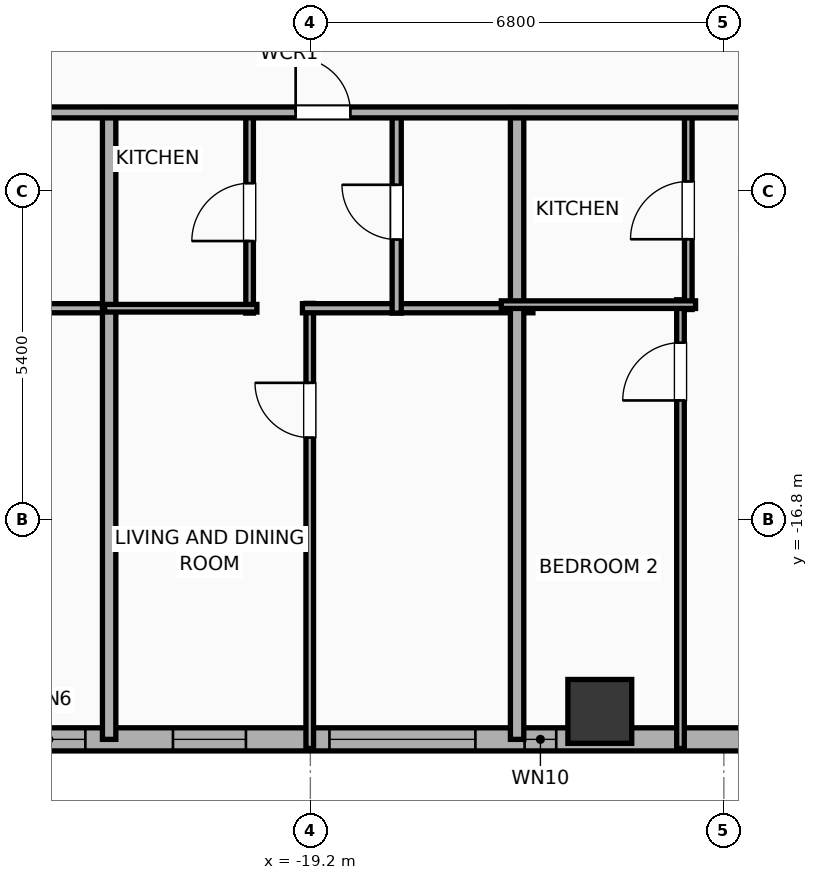
"""IFC4 building model, lengths in metres.
Left out: names, types, materials, properties, quantities, classifications, styles, units other than length and angle.
Written with IfcOpenShell. Run it as: python <this file> out.ifc"""

import sys

from ifc_helpers import new_model, si_unit, direction, frame, frame_2d, origin, origin_2d, place, context, subcontext, project, spatial, rectangle, hollow_rectangle, extrude, element, fill, save


model = new_model("IFC4")
c1 = context("Model", 3, precision=1e-05, world=origin(), true_north=direction((0.0, 1.0)))
c2 = subcontext(c1, "Body", "Model", "MODEL_VIEW")
j1 = project(units=[si_unit("LENGTHUNIT", "METRE"), si_unit("PLANEANGLEUNIT", "RADIAN")], contexts=[c1])
p1 = place(None, origin())
s1 = spatial("IfcSite", under=j1, at=p1, CompositionType="ELEMENT")
p2 = place(p1, origin())
s2 = spatial("IfcBuilding", under=s1, at=p2, CompositionType="ELEMENT")
p3 = place(p2, frame((0.0, 0.0, 105.3)))
s3 = spatial("IfcBuildingStorey", under=s2, at=p3, CompositionType="ELEMENT", Elevation=105.3)
p4 = place(p3, frame((-14.44, -19.95, 0.0), z_axis=(0.0, 0.0, 1.0), x_axis=(1.0, 0.0, 0.0)))
e1 = element("IfcColumn", 1, at=p4, inside=s3, PredefinedType="COLUMN", context=c2, shape_type="SweptSolid", body=[
    extrude(hollow_rectangle(XDim=1.05, YDim=1.05, WallThickness=0.036, at=origin_2d()), origin(), (0.0, 0.0, 1.0), 3.9),
])
p5 = place(p3, frame((29.381, -20.41, 0.0), z_axis=(0.0, 0.0, 1.0), x_axis=(-1.0, 0.0, 0.0)))
e2 = element("IfcWall", 2, at=p5, inside=s3, PredefinedType="ELEMENTEDWALL", context=c2, shape_type="SweptSolid", body=[
    extrude(rectangle(XDim=54.763, YDim=0.38, at=frame_2d((27.381, 0.0))), origin(), (0.0, 0.0, 1.0), 3.65),
])
p6 = place(p5, frame((6.495, 0.0, 0.75)))
e3 = element("IfcOpeningElement", 3, at=p6, cuts=e2, PredefinedType="OPENING", context=c2, shape_type="SweptSolid", body=[
    extrude(rectangle(XDim=2.4, YDim=2.1, at=frame_2d((1.2, 1.05))), frame((0.0, 0.2, 0.0), z_axis=(0.0, -1.0, 0.0), x_axis=(1.0, 0.0, 0.0)), (0.0, 0.0, 1.0), 0.4),
])
p7 = place(p5, frame((17.686, 0.0, 0.75)))
e4 = element("IfcOpeningElement", 4, at=p7, cuts=e2, PredefinedType="OPENING", context=c2, shape_type="SweptSolid", body=[
    extrude(rectangle(XDim=2.4, YDim=2.1, at=frame_2d((1.2, 1.05))), frame((0.0, 0.2, 0.0), z_axis=(0.0, -1.0, 0.0), x_axis=(1.0, 0.0, 0.0)), (0.0, 0.0, 1.0), 0.4),
])
p8 = place(p5, frame((34.677, 0.0, 0.75)))
e5 = element("IfcOpeningElement", 5, at=p8, cuts=e2, PredefinedType="OPENING", context=c2, shape_type="SweptSolid", body=[
    extrude(rectangle(XDim=2.4, YDim=2.1, at=frame_2d((1.2, 1.05))), frame((0.0, 0.2, 0.0), z_axis=(0.0, -1.0, 0.0), x_axis=(1.0, 0.0, 0.0)), (0.0, 0.0, 1.0), 0.4),
])
p9 = place(p5, frame((45.867, 0.0, 0.75)))
e6 = element("IfcOpeningElement", 6, at=p9, cuts=e2, PredefinedType="OPENING", context=c2, shape_type="SweptSolid", body=[
    extrude(rectangle(XDim=2.4, YDim=2.1, at=frame_2d((1.2, 1.05))), frame((0.0, 0.2, 0.0), z_axis=(0.0, -1.0, 0.0), x_axis=(1.0, 0.0, 0.0)), (0.0, 0.0, 1.0), 0.4),
])
p10 = place(p5, frame((52.281, 0.0, 0.75)))
e7 = element("IfcOpeningElement", 7, at=p10, cuts=e2, PredefinedType="OPENING", context=c2, shape_type="SweptSolid", body=[
    extrude(rectangle(XDim=1.2, YDim=2.05, at=frame_2d((0.6, 1.025))), frame((0.0, 0.2, 0.0), z_axis=(0.0, -1.0, 0.0), x_axis=(1.0, 0.0, 0.0)), (0.0, 0.0, 1.0), 0.4),
])
p11 = place(p5, frame((49.641, 0.0, 0.75)))
e8 = element("IfcOpeningElement", 8, at=p11, cuts=e2, PredefinedType="OPENING", context=c2, shape_type="SweptSolid", body=[
    extrude(rectangle(XDim=1.2, YDim=2.05, at=frame_2d((0.6, 1.025))), frame((0.0, 0.2, 0.0), z_axis=(0.0, -1.0, 0.0), x_axis=(1.0, 0.0, 0.0)), (0.0, 0.0, 1.0), 0.4),
])
p12 = place(p5, frame((39.543, 0.0, 0.75)))
e9 = element("IfcOpeningElement", 9, at=p12, cuts=e2, PredefinedType="OPENING", context=c2, shape_type="SweptSolid", body=[
    extrude(rectangle(XDim=1.2, YDim=2.05, at=frame_2d((0.6, 1.025))), frame((0.0, 0.2, 0.0), z_axis=(0.0, -1.0, 0.0), x_axis=(1.0, 0.0, 0.0)), (0.0, 0.0, 1.0), 0.4),
])
p13 = place(p5, frame((44.538, 0.0, 0.75)))
e10 = element("IfcOpeningElement", 10, at=p13, cuts=e2, PredefinedType="OPENING", context=c2, shape_type="SweptSolid", body=[
    extrude(rectangle(XDim=0.52, YDim=2.05, at=frame_2d((0.26, 1.025))), frame((0.0, 0.2, 0.0), z_axis=(0.0, -1.0, 0.0), x_axis=(1.0, 0.0, 0.0)), (0.0, 0.0, 1.0), 0.4),
])
p14 = place(p5, frame((28.206, 0.0, 0.75)))
e11 = element("IfcOpeningElement", 11, at=p14, cuts=e2, PredefinedType="OPENING", context=c2, shape_type="SweptSolid", body=[
    extrude(rectangle(XDim=1.2, YDim=2.05, at=frame_2d((0.6, 1.025))), frame((0.0, 0.2, 0.0), z_axis=(0.0, -1.0, 0.0), x_axis=(1.0, 0.0, 0.0)), (0.0, 0.0, 1.0), 0.4),
])
p15 = place(p5, frame((31.241, 0.0, 0.75)))
e12 = element("IfcOpeningElement", 12, at=p15, cuts=e2, PredefinedType="OPENING", context=c2, shape_type="SweptSolid", body=[
    extrude(rectangle(XDim=0.85, YDim=2.05, at=frame_2d((0.425, 1.025))), frame((0.0, 0.2, 0.0), z_axis=(0.0, -1.0, 0.0), x_axis=(1.0, 0.0, 0.0)), (0.0, 0.0, 1.0), 0.4),
])
p16 = place(p5, frame((24.561, 0.0, 0.75)))
e13 = element("IfcOpeningElement", 13, at=p16, cuts=e2, PredefinedType="OPENING", context=c2, shape_type="SweptSolid", body=[
    extrude(rectangle(XDim=1.2, YDim=2.05, at=frame_2d((0.6, 1.025))), frame((0.0, 0.2, 0.0), z_axis=(0.0, -1.0, 0.0), x_axis=(1.0, 0.0, 0.0)), (0.0, 0.0, 1.0), 0.4),
])
p17 = place(p5, frame((22.561, 0.0, 0.75)))
e14 = element("IfcOpeningElement", 14, at=p17, cuts=e2, PredefinedType="OPENING", context=c2, shape_type="SweptSolid", body=[
    extrude(rectangle(XDim=0.52, YDim=2.05, at=frame_2d((0.26, 1.025))), frame((0.0, 0.2, 0.0), z_axis=(0.0, -1.0, 0.0), x_axis=(1.0, 0.0, 0.0)), (0.0, 0.0, 1.0), 0.4),
])
p18 = place(p5, frame((13.886, 0.0, 0.75)))
e15 = element("IfcOpeningElement", 15, at=p18, cuts=e2, PredefinedType="OPENING", context=c2, shape_type="SweptSolid", body=[
    extrude(rectangle(XDim=1.2, YDim=2.05, at=frame_2d((0.6, 1.025))), frame((0.0, 0.2, 0.0), z_axis=(0.0, -1.0, 0.0), x_axis=(1.0, 0.0, 0.0)), (0.0, 0.0, 1.0), 0.4),
])
p19 = place(p5, frame((11.694, 0.0, 0.75)))
e16 = element("IfcOpeningElement", 16, at=p19, cuts=e2, PredefinedType="OPENING", context=c2, shape_type="SweptSolid", body=[
    extrude(rectangle(XDim=0.85, YDim=2.05, at=frame_2d((0.425, 1.025))), frame((0.0, 0.2, 0.0), z_axis=(0.0, -1.0, 0.0), x_axis=(1.0, 0.0, 0.0)), (0.0, 0.0, 1.0), 0.4),
])
p20 = place(p5, frame((3.286, 0.0, 0.75)))
e17 = element("IfcOpeningElement", 17, at=p20, cuts=e2, PredefinedType="OPENING", context=c2, shape_type="SweptSolid", body=[
    extrude(rectangle(XDim=1.2, YDim=2.05, at=frame_2d((0.6, 1.025))), frame((0.0, 0.2, 0.0), z_axis=(0.0, -1.0, 0.0), x_axis=(1.0, 0.0, 0.0)), (0.0, 0.0, 1.0), 0.4),
])
p21 = place(p5, frame((0.816, 0.0, 0.75)))
e18 = element("IfcOpeningElement", 18, at=p21, cuts=e2, PredefinedType="OPENING", context=c2, shape_type="SweptSolid", body=[
    extrude(rectangle(XDim=1.2, YDim=2.05, at=frame_2d((0.6, 1.025))), frame((0.0, 0.2, 0.0), z_axis=(0.0, -1.0, 0.0), x_axis=(1.0, 0.0, 0.0)), (0.0, 0.0, 1.0), 0.4),
])
p22 = place(p3, frame((-26.039, -13.32, 0.0), z_axis=(0.0, 0.0, 1.0), x_axis=(1.0, 0.0, 0.0)))
e19 = element("IfcWall", 19, at=p22, inside=s3, PredefinedType="PLUMBINGWALL", context=c2, shape_type="SweptSolid", body=[
    extrude(rectangle(XDim=3.605, YDim=0.15, at=frame_2d((1.802, 0.0))), origin(), (0.0, 0.0, 1.0), 3.65),
])
p23 = place(p3, frame((-22.509, -20.41, 0.0), z_axis=(0.0, 0.0, 1.0), x_axis=(0.0, 1.0, 0.0)))
e20 = element("IfcWall", 20, at=p23, inside=s3, PredefinedType="PARTITIONING", context=c2, shape_type="SweptSolid", body=[
    extrude(rectangle(XDim=10.39, YDim=0.22, at=frame_2d((5.195, 0.0))), origin(), (0.0, 0.0, 1.0), 3.65),
])
p24 = place(p3, frame((-19.21, -20.56, 0.0), z_axis=(0.0, 0.0, 1.0), x_axis=(0.0, 1.0, 0.0)))
e21 = element("IfcWall", 21, at=p24, inside=s3, PredefinedType="PARTITIONING", context=c2, shape_type="SweptSolid", body=[
    extrude(rectangle(XDim=7.32, YDim=0.125, at=frame_2d((3.66, 0.0))), origin(), (0.0, 0.0, 1.0), 3.65),
])
p25 = place(p24, frame((5.113, 0.0, 0.0)))
e22 = element("IfcOpeningElement", 22, at=p25, cuts=e21, PredefinedType="OPENING", context=c2, shape_type="SweptSolid", body=[
    extrude(rectangle(XDim=0.9, YDim=2.05, at=frame_2d((0.45, 1.025))), frame((0.0, 0.073, 0.0), z_axis=(0.0, -1.0, 0.0), x_axis=(1.0, 0.0, 0.0)), (0.0, 0.0, 1.0), 0.145),
])
p26 = place(p3, frame((-19.33, -13.32, 0.0), z_axis=(0.0, 0.0, 1.0), x_axis=(1.0, 0.0, 0.0)))
e23 = element("IfcWall", 23, at=p26, inside=s3, PredefinedType="PLUMBINGWALL", context=c2, shape_type="SweptSolid", body=[
    extrude(rectangle(XDim=3.79, YDim=0.15, at=frame_2d((1.895, 0.0))), origin(), (0.0, 0.0, 1.0), 3.65),
])
p27 = place(p3, frame((-20.199, -13.4, 0.0), z_axis=(0.0, 0.0, 1.0), x_axis=(0.0, 1.0, 0.0)))
e24 = element("IfcWall", 24, at=p27, inside=s3, PredefinedType="PARTITIONING", context=c2, shape_type="SweptSolid", body=[
    extrude(rectangle(XDim=3.32, YDim=0.125, at=frame_2d((1.66, 0.0))), origin(), (0.0, 0.0, 1.0), 3.65),
])
p28 = place(p27, frame((1.185, 0.0, 0.0)))
e25 = element("IfcOpeningElement", 25, at=p28, cuts=e24, PredefinedType="OPENING", context=c2, shape_type="SweptSolid", body=[
    extrude(rectangle(XDim=0.95, YDim=2.05, at=frame_2d((0.475, 1.025))), frame((0.0, 0.073, 0.0), z_axis=(0.0, -1.0, 0.0), x_axis=(1.0, 0.0, 0.0)), (0.0, 0.0, 1.0), 0.145),
])
p29 = place(p3, frame((-22.584, -13.32, 0.0), z_axis=(0.0, 0.0, 1.0), x_axis=(1.0, 0.0, 0.0)))
e26 = element("IfcWall", 26, at=p29, inside=s3, PredefinedType="PARTITIONING", context=c2, shape_type="SweptSolid", body=[
    extrude(rectangle(XDim=2.505, YDim=0.125, at=frame_2d((1.252, 0.0))), origin(), (0.0, 0.0, 1.0), 3.65),
])
p30 = place(p3, frame((-17.78, -13.4, 0.0), z_axis=(0.0, 0.0, 1.0), x_axis=(0.0, 1.0, 0.0)))
e27 = element("IfcWall", 27, at=p30, inside=s3, PredefinedType="PLUMBINGWALL", context=c2, shape_type="SweptSolid", body=[
    extrude(rectangle(XDim=3.32, YDim=0.15, at=frame_2d((1.66, 0.0))), origin(), (0.0, 0.0, 1.0), 3.65),
])
p31 = place(p30, frame((1.21, 0.0, 0.0)))
e28 = element("IfcOpeningElement", 28, at=p31, cuts=e27, PredefinedType="OPENING", context=c2, shape_type="SweptSolid", body=[
    extrude(rectangle(XDim=0.9, YDim=2.05, at=frame_2d((0.45, 1.025))), frame((0.0, 0.085, 0.0), z_axis=(0.0, -1.0, 0.0), x_axis=(1.0, 0.0, 0.0)), (0.0, 0.0, 1.0), 0.17),
])
p32 = place(p3, frame((-15.8, -20.41, 0.0), z_axis=(0.0, 0.0, 1.0), x_axis=(0.0, 1.0, 0.0)))
e29 = element("IfcWall", 29, at=p32, inside=s3, PredefinedType="PARTITIONING", context=c2, shape_type="SweptSolid", body=[
    extrude(rectangle(XDim=10.39, YDim=0.22, at=frame_2d((5.195, 0.0))), origin(), (0.0, 0.0, 1.0), 3.65),
])
p33 = place(p3, frame((-13.113, -20.56, 0.0), z_axis=(0.0, 0.0, 1.0), x_axis=(0.0, 1.0, 0.0)))
e30 = element("IfcWall", 30, at=p33, inside=s3, PredefinedType="PARTITIONING", context=c2, shape_type="SweptSolid", body=[
    extrude(rectangle(XDim=7.379, YDim=0.125, at=frame_2d((3.689, 0.0))), origin(), (0.0, 0.0, 1.0), 3.65),
])
p34 = place(p33, frame((5.723, 0.0, 0.0)))
e31 = element("IfcOpeningElement", 31, at=p34, cuts=e30, PredefinedType="OPENING", context=c2, shape_type="SweptSolid", body=[
    extrude(rectangle(XDim=0.95, YDim=2.05, at=frame_2d((0.475, 1.025))), frame((0.0, 0.073, 0.0), z_axis=(0.0, -1.0, 0.0), x_axis=(1.0, 0.0, 0.0)), (0.0, 0.0, 1.0), 0.145),
])
p35 = place(p3, frame((-12.985, -13.341, 0.0), z_axis=(0.0, 0.0, 1.0), x_axis=(0.0, 1.0, 0.0)))
e32 = element("IfcWall", 32, at=p35, inside=s3, PredefinedType="PARTITIONING", context=c2, shape_type="SweptSolid", body=[
    extrude(rectangle(XDim=3.261, YDim=0.125, at=frame_2d((1.63, 0.0))), origin(), (0.0, 0.0, 1.0), 3.65),
])
p36 = place(p35, frame((1.156, 0.0, 0.0)))
e33 = element("IfcOpeningElement", 33, at=p36, cuts=e32, PredefinedType="OPENING", context=c2, shape_type="SweptSolid", body=[
    extrude(rectangle(XDim=0.95, YDim=2.05, at=frame_2d((0.475, 1.025))), frame((0.0, 0.073, 0.0), z_axis=(0.0, -1.0, 0.0), x_axis=(1.0, 0.0, 0.0)), (0.0, 0.0, 1.0), 0.145),
])
p37 = place(p3, frame((-16.06, -13.261, 0.0), z_axis=(0.0, 0.0, 1.0), x_axis=(1.0, 0.0, 0.0)))
e34 = element("IfcWall", 34, at=p37, inside=s3, PredefinedType="PARTITIONING", context=c2, shape_type="SweptSolid", body=[
    extrude(rectangle(XDim=3.195, YDim=0.125, at=frame_2d((1.598, 0.0))), origin(), (0.0, 0.0, 1.0), 3.65),
])
p38 = place(p3, frame((-29.21, -10.1, 0.0), z_axis=(0.0, 0.0, 1.0), x_axis=(1.0, 0.0, 0.0)))
e35 = element("IfcWall", 35, at=p38, inside=s3, PredefinedType="PARTITIONING", context=c2, shape_type="SweptSolid", body=[
    extrude(rectangle(XDim=62.42, YDim=0.18, at=frame_2d((31.21, 0.0))), origin(), (0.0, 0.0, 1.0), 3.65),
])
p39 = place(p38, frame((3.033, 0.0, 0.0)))
e36 = element("IfcOpeningElement", 36, at=p39, cuts=e35, PredefinedType="OPENING", context=c2, shape_type="SweptSolid", body=[
    extrude(rectangle(XDim=0.9, YDim=2.05, at=frame_2d((0.45, 1.025))), frame((0.0, 0.1, 0.0), z_axis=(0.0, -1.0, 0.0), x_axis=(1.0, 0.0, 0.0)), (0.0, 0.0, 1.0), 0.2),
])
p40 = place(p38, frame((9.768, 0.0, 0.0)))
e37 = element("IfcOpeningElement", 37, at=p40, cuts=e35, PredefinedType="OPENING", context=c2, shape_type="SweptSolid", body=[
    extrude(rectangle(XDim=0.9, YDim=2.05, at=frame_2d((0.45, 1.025))), frame((0.0, 0.1, 0.0), z_axis=(0.0, -1.0, 0.0), x_axis=(1.0, 0.0, 0.0)), (0.0, 0.0, 1.0), 0.2),
])
p41 = place(p38, frame((18.65, 0.0, 0.0)))
e38 = element("IfcOpeningElement", 38, at=p41, cuts=e35, PredefinedType="OPENING", context=c2, shape_type="SweptSolid", body=[
    extrude(rectangle(XDim=1.15, YDim=2.05, at=frame_2d((0.575, 1.025))), frame((0.0, 0.1, 0.0), z_axis=(0.0, -1.0, 0.0), x_axis=(1.0, 0.0, 0.0)), (0.0, 0.0, 1.0), 0.2),
])
p42 = place(p38, frame((29.212, 0.0, 0.0)))
e39 = element("IfcOpeningElement", 39, at=p42, cuts=e35, PredefinedType="OPENING", context=c2, shape_type="SweptSolid", body=[
    extrude(rectangle(XDim=1.15, YDim=2.05, at=frame_2d((0.575, 1.025))), frame((0.0, 0.1, 0.0), z_axis=(0.0, -1.0, 0.0), x_axis=(1.0, 0.0, 0.0)), (0.0, 0.0, 1.0), 0.2),
])
p43 = place(p38, frame((40.379, 0.0, 0.0)))
e40 = element("IfcOpeningElement", 40, at=p43, cuts=e35, PredefinedType="OPENING", context=c2, shape_type="SweptSolid", body=[
    extrude(rectangle(XDim=1.15, YDim=2.05, at=frame_2d((0.575, 1.025))), frame((0.0, 0.1, 0.0), z_axis=(0.0, -1.0, 0.0), x_axis=(1.0, 0.0, 0.0)), (0.0, 0.0, 1.0), 0.2),
])
p44 = place(p38, frame((50.959, 0.0, 0.0)))
e41 = element("IfcOpeningElement", 41, at=p44, cuts=e35, PredefinedType="OPENING", context=c2, shape_type="SweptSolid", body=[
    extrude(rectangle(XDim=1.15, YDim=2.05, at=frame_2d((0.575, 1.025))), frame((0.0, 0.1, 0.0), z_axis=(0.0, -1.0, 0.0), x_axis=(1.0, 0.0, 0.0)), (0.0, 0.0, 1.0), 0.2),
])
p45 = place(p38, frame((59.117, 0.0, 0.0)))
e42 = element("IfcOpeningElement", 42, at=p45, cuts=e35, PredefinedType="OPENING", context=c2, shape_type="SweptSolid", body=[
    extrude(rectangle(XDim=0.9, YDim=2.05, at=frame_2d((0.45, 1.025))), frame((0.0, 0.1, 0.0), z_axis=(0.0, -1.0, 0.0), x_axis=(1.0, 0.0, 0.0)), (0.0, 0.0, 1.0), 0.2),
])
p46 = place(p9, origin())
e43 = element("IfcWindow", 43, at=p46, inside=s3, PartitioningType="SINGLE_PANEL", PredefinedType="WINDOW", context=c2, shape_type="SweptSolid", body=[
    extrude(rectangle(XDim=2.4, YDim=2.1, at=frame_2d((1.2, 1.05))), frame((0.0, 0.03, 0.0), z_axis=(0.0, -1.0, 0.0), x_axis=(1.0, 0.0, 0.0)), (0.0, 0.0, 1.0), 0.06),
])
fill(e6, e43)
p47 = place(p10, origin())
e44 = element("IfcWindow", 44, at=p47, inside=s3, PartitioningType="SINGLE_PANEL", PredefinedType="WINDOW", context=c2, shape_type="SweptSolid", body=[
    extrude(rectangle(XDim=1.2, YDim=2.05, at=frame_2d((0.6, 1.025))), frame((0.0, 0.03, 0.0), z_axis=(0.0, -1.0, 0.0), x_axis=(1.0, 0.0, 0.0)), (0.0, 0.0, 1.0), 0.06),
])
fill(e7, e44)
p48 = place(p11, origin())
e45 = element("IfcWindow", 45, at=p48, inside=s3, PartitioningType="SINGLE_PANEL", PredefinedType="WINDOW", context=c2, shape_type="SweptSolid", body=[
    extrude(rectangle(XDim=1.2, YDim=2.05, at=frame_2d((0.6, 1.025))), frame((0.0, 0.03, 0.0), z_axis=(0.0, -1.0, 0.0), x_axis=(1.0, 0.0, 0.0)), (0.0, 0.0, 1.0), 0.06),
])
fill(e8, e45)
p49 = place(p13, origin())
e46 = element("IfcWindow", 46, at=p49, inside=s3, PartitioningType="SINGLE_PANEL", PredefinedType="WINDOW", context=c2, shape_type="SweptSolid", body=[
    extrude(rectangle(XDim=0.52, YDim=2.05, at=frame_2d((0.26, 1.025))), frame((0.0, 0.03, 0.0), z_axis=(0.0, -1.0, 0.0), x_axis=(1.0, 0.0, 0.0)), (0.0, 0.0, 1.0), 0.06),
])
fill(e10, e46)
p50 = place(p25, origin())
e47 = element("IfcDoor", 47, at=p50, inside=s3, OperationType="SINGLE_SWING_RIGHT", PredefinedType="DOOR", context=c2, shape_type="SweptSolid", body=[
    extrude(rectangle(XDim=0.9, YDim=2.05, at=frame_2d((0.45, 1.025))), frame((0.0, 0.025, 0.0), z_axis=(0.0, -1.0, 0.0), x_axis=(1.0, 0.0, 0.0)), (0.0, 0.0, 1.0), 0.05),
])
fill(e22, e47)
p51 = place(p28, origin())
e48 = element("IfcDoor", 48, at=p51, inside=s3, OperationType="SINGLE_SWING_LEFT", PredefinedType="DOOR", context=c2, shape_type="SweptSolid", body=[
    extrude(rectangle(XDim=0.95, YDim=2.05, at=frame_2d((0.475, 1.025))), frame((0.0, 0.025, 0.0), z_axis=(0.0, -1.0, 0.0), x_axis=(1.0, 0.0, 0.0)), (0.0, 0.0, 1.0), 0.05),
])
fill(e25, e48)
p52 = place(p31, origin())
e49 = element("IfcDoor", 49, at=p52, inside=s3, OperationType="SINGLE_SWING_RIGHT", PredefinedType="DOOR", context=c2, shape_type="SweptSolid", body=[
    extrude(rectangle(XDim=0.9, YDim=2.05, at=frame_2d((0.45, 1.025))), frame((0.0, 0.025, 0.0), z_axis=(0.0, -1.0, 0.0), x_axis=(1.0, 0.0, 0.0)), (0.0, 0.0, 1.0), 0.05),
])
fill(e28, e49)
p53 = place(p34, origin())
e50 = element("IfcDoor", 50, at=p53, inside=s3, OperationType="SINGLE_SWING_LEFT", PredefinedType="DOOR", context=c2, shape_type="SweptSolid", body=[
    extrude(rectangle(XDim=0.95, YDim=2.05, at=frame_2d((0.475, 1.025))), frame((0.0, 0.025, 0.0), z_axis=(0.0, -1.0, 0.0), x_axis=(1.0, 0.0, 0.0)), (0.0, 0.0, 1.0), 0.05),
])
fill(e31, e50)
p54 = place(p36, origin())
e51 = element("IfcDoor", 51, at=p54, inside=s3, OperationType="SINGLE_SWING_LEFT", PredefinedType="DOOR", context=c2, shape_type="SweptSolid", body=[
    extrude(rectangle(XDim=0.95, YDim=2.05, at=frame_2d((0.475, 1.025))), frame((0.0, 0.025, 0.0), z_axis=(0.0, -1.0, 0.0), x_axis=(1.0, 0.0, 0.0)), (0.0, 0.0, 1.0), 0.05),
])
fill(e33, e51)
p55 = place(p40, origin())
e52 = element("IfcDoor", 52, at=p55, inside=s3, OperationType="SINGLE_SWING_LEFT", PredefinedType="DOOR", context=c2, shape_type="SweptSolid", body=[
    extrude(rectangle(XDim=0.9, YDim=2.05, at=frame_2d((0.45, 1.025))), frame((0.0, 0.025, 0.0), z_axis=(0.0, -1.0, 0.0), x_axis=(1.0, 0.0, 0.0)), (0.0, 0.0, 1.0), 0.05),
])
fill(e37, e52)
save(model, sys.argv[1])
